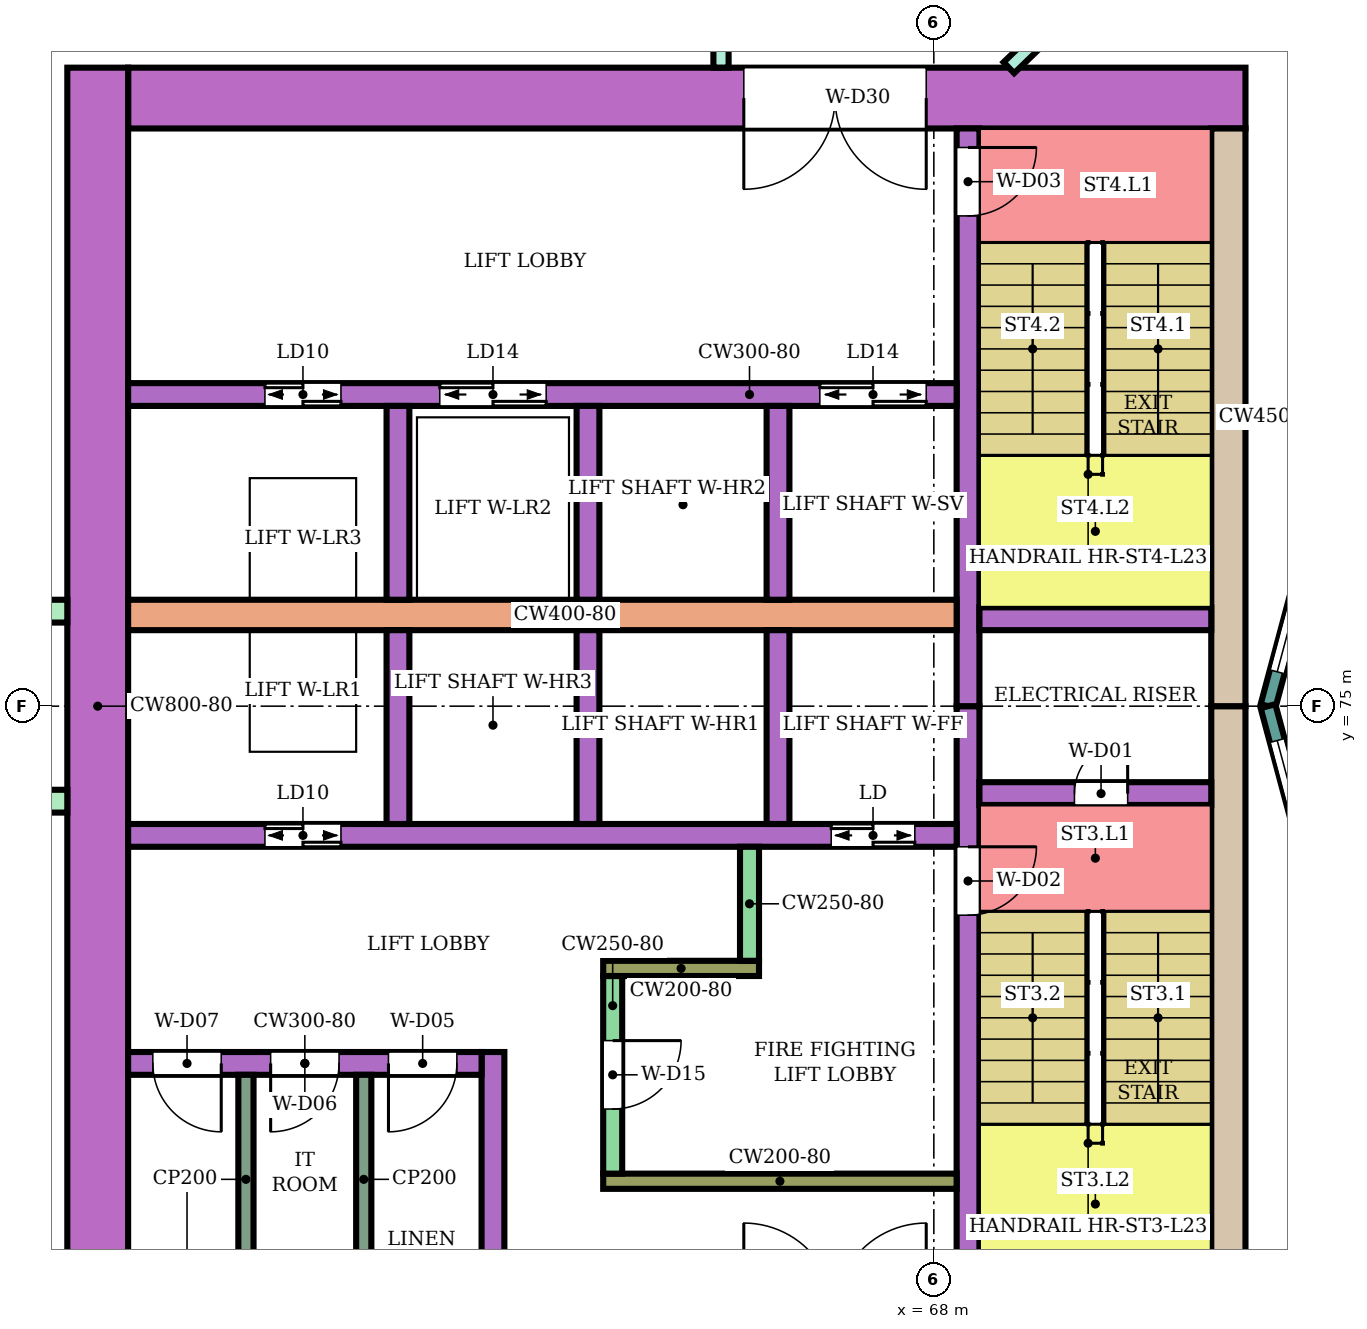
"""IFC4 building model, lengths in metres.
Left out: names, types, materials, properties, quantities, classifications, styles, units other than length and angle.
Written with IfcOpenShell. Run it as: python <this file> out.ifc"""

import sys

from ifc_helpers import new_model, si_unit, direction, frame, frame_2d, origin, place, context, subcontext, project, spatial, rectangle, extrude, element, fill, save


model = new_model("IFC4")
c1 = context("Model", 3, precision=1e-05, world=origin(), true_north=direction((0.0, 1.0)))
c2 = subcontext(c1, "Body", "Model", "MODEL_VIEW")
j1 = project(units=[si_unit("LENGTHUNIT", "METRE"), si_unit("PLANEANGLEUNIT", "RADIAN")], contexts=[c1])
p1 = place(None, origin())
s1 = spatial("IfcSite", under=j1, at=p1, CompositionType="ELEMENT")
p2 = place(p1, origin())
s2 = spatial("IfcBuilding", under=s1, at=p2, CompositionType="ELEMENT")
p3 = place(p2, frame((0.0, 0.0, 101.4)))
s3 = spatial("IfcBuildingStorey", under=s2, at=p3, CompositionType="ELEMENT", Elevation=101.4)
p4 = place(p3, frame((72.1, 83.0, 0.0), z_axis=(0.0, 0.0, 1.0), x_axis=(-1.0, 0.0, 0.0)))
e1 = element("IfcWall", 1, at=p4, inside=s3, PredefinedType="SHEAR", context=c2, shape_type="SweptSolid", body=[
    extrude(rectangle(XDim=14.7, YDim=0.8, at=frame_2d((7.35, 0.0))), origin(), (0.0, 0.0, 1.0), 3.48),
])
p5 = place(p4, frame((4.2, 0.0, 0.0)))
e2 = element("IfcOpeningElement", 2, at=p5, cuts=e1, PredefinedType="OPENING", context=c2, shape_type="SweptSolid", body=[
    extrude(rectangle(XDim=2.4, YDim=2.4, at=frame_2d((1.2, 1.2))), frame((0.0, 0.41, 0.0), z_axis=(0.0, -1.0, 0.0), x_axis=(1.0, 0.0, 0.0)), (0.0, 0.0, 1.0), 0.82),
])
for number, where, z_axis, x_axis in (
    (3, (71.875, 75.0, 0.0), (0.0, 0.0, 1.0), (0.0, -1.0, 0.0)),
    (4, (71.875, 82.6, 0.0), (0.0, 0.0, 1.0), (0.0, -1.0, 0.0)),
):
    element("IfcWall", number, at=place(p3, frame(where, z_axis=z_axis, x_axis=x_axis)), inside=s3, PredefinedType="SHEAR", context=c2, shape_type="SweptSolid", body=[
        extrude(rectangle(XDim=7.6, YDim=0.45, at=frame_2d((3.8, 0.0))), origin(), (0.0, 0.0, 1.0), 3.48),
    ])
p6 = place(p3, frame((57.0, 83.4, 0.0), z_axis=(0.0, 0.0, 1.0), x_axis=(0.0, -1.0, 0.0)))
e5 = element("IfcWall", 5, at=p6, inside=s3, PredefinedType="SHEAR", context=c2, shape_type="SweptSolid", body=[
    extrude(rectangle(XDim=16.8, YDim=0.8, at=frame_2d((8.4, 0.0))), origin(), (0.0, 0.0, 1.0), 3.48),
])
p7 = place(p3, frame((68.45, 75.0, 0.0), z_axis=(0.0, 0.0, 1.0), x_axis=(0.0, -1.0, 0.0)))
e6 = element("IfcWall", 6, at=p7, inside=s3, PredefinedType="SHEAR", context=c2, shape_type="SweptSolid", body=[
    extrude(rectangle(XDim=7.6, YDim=0.3, at=frame_2d((3.8, 0.0))), origin(), (0.0, 0.0, 1.0), 3.48),
])
p8 = place(p7, frame((1.85, 0.0, 0.0)))
e7 = element("IfcOpeningElement", 7, at=p8, cuts=e6, PredefinedType="OPENING", context=c2, shape_type="SweptSolid", body=[
    extrude(rectangle(XDim=0.9, YDim=2.1, at=frame_2d((0.45, 1.05))), frame((0.0, 0.16, 0.0), z_axis=(0.0, -1.0, 0.0), x_axis=(1.0, 0.0, 0.0)), (0.0, 0.0, 1.0), 0.32),
])
p9 = place(p3, frame((68.45, 82.6, 0.0), z_axis=(0.0, 0.0, 1.0), x_axis=(0.0, -1.0, 0.0)))
e8 = element("IfcWall", 8, at=p9, inside=s3, PredefinedType="SHEAR", context=c2, shape_type="SweptSolid", body=[
    extrude(rectangle(XDim=7.6, YDim=0.3, at=frame_2d((3.8, 0.0))), origin(), (0.0, 0.0, 1.0), 3.48),
])
p10 = place(p9, frame((0.25, 0.0, 0.0)))
e9 = element("IfcOpeningElement", 9, at=p10, cuts=e8, PredefinedType="OPENING", context=c2, shape_type="SweptSolid", body=[
    extrude(rectangle(XDim=0.9, YDim=2.1, at=frame_2d((0.45, 1.05))), frame((0.0, 0.16, 0.0), z_axis=(0.0, -1.0, 0.0), x_axis=(1.0, 0.0, 0.0)), (0.0, 0.0, 1.0), 0.32),
])
p11 = place(p3, frame((71.65, 73.85, 0.0), z_axis=(0.0, 0.0, 1.0), x_axis=(-1.0, 0.0, 0.0)))
e10 = element("IfcWall", 10, at=p11, inside=s3, PredefinedType="SHEAR", context=c2, shape_type="SweptSolid", body=[
    extrude(rectangle(XDim=3.05, YDim=0.3, at=frame_2d((1.525, 0.0))), origin(), (0.0, 0.0, 1.0), 3.48),
])
p12 = place(p11, frame((1.1, 0.0, 0.0)))
e11 = element("IfcOpeningElement", 11, at=p12, cuts=e10, PredefinedType="OPENING", context=c2, shape_type="SweptSolid", body=[
    extrude(rectangle(XDim=0.7, YDim=2.0, at=frame_2d((0.35, 1.0))), frame((0.0, 0.16, 0.0), z_axis=(0.0, -1.0, 0.0), x_axis=(1.0, 0.0, 0.0)), (0.0, 0.0, 1.0), 0.32),
])
p13 = place(p3, frame((71.65, 76.15, 0.0), z_axis=(0.0, 0.0, 1.0), x_axis=(-1.0, 0.0, 0.0)))
e12 = element("IfcWall", 12, at=p13, inside=s3, PredefinedType="SHEAR", context=c2, shape_type="SweptSolid", body=[
    extrude(rectangle(XDim=3.05, YDim=0.3, at=frame_2d((1.525, 0.0))), origin(), (0.0, 0.0, 1.0), 3.48),
])
p14 = place(p3, frame((68.3, 73.3, 0.0), z_axis=(0.0, 0.0, 1.0), x_axis=(-1.0, 0.0, 0.0)))
e13 = element("IfcWall", 13, at=p14, inside=s3, PredefinedType="SHEAR", context=c2, shape_type="SweptSolid", body=[
    extrude(rectangle(XDim=10.9, YDim=0.3, at=frame_2d((5.45, 0.0))), origin(), (0.0, 0.0, 1.0), 3.48),
])
p15 = place(p14, frame((0.55, 0.0, 0.0)))
e14 = element("IfcOpeningElement", 14, at=p15, cuts=e13, PredefinedType="OPENING", context=c2, shape_type="SweptSolid", body=[
    extrude(rectangle(XDim=1.1, YDim=2.1, at=frame_2d((0.55, 1.05))), frame((0.0, 0.16, 0.0), z_axis=(0.0, -1.0, 0.0), x_axis=(1.0, 0.0, 0.0)), (0.0, 0.0, 1.0), 0.32),
])
p16 = place(p14, frame((8.1, 0.0, 0.0)))
e15 = element("IfcOpeningElement", 15, at=p16, cuts=e13, PredefinedType="OPENING", context=c2, shape_type="SweptSolid", body=[
    extrude(rectangle(XDim=1.0, YDim=2.1, at=frame_2d((0.5, 1.05))), frame((0.0, 0.16, 0.0), z_axis=(0.0, -1.0, 0.0), x_axis=(1.0, 0.0, 0.0)), (0.0, 0.0, 1.0), 0.32),
])
p17 = place(p3, frame((68.3, 76.2, 0.0), z_axis=(0.0, 0.0, 1.0), x_axis=(-1.0, 0.0, 0.0)))
e16 = element("IfcWall", 16, at=p17, inside=s3, PredefinedType="SHEAR", context=c2, shape_type="SweptSolid", body=[
    extrude(rectangle(XDim=10.9, YDim=0.4, at=frame_2d((5.45, 0.0))), origin(), (0.0, 0.0, 1.0), 3.48),
])
p18 = place(p3, frame((68.3, 79.1, 0.0), z_axis=(0.0, 0.0, 1.0), x_axis=(-1.0, 0.0, 0.0)))
e17 = element("IfcWall", 17, at=p18, inside=s3, PredefinedType="SHEAR", context=c2, shape_type="SweptSolid", body=[
    extrude(rectangle(XDim=10.9, YDim=0.3, at=frame_2d((5.45, 0.0))), origin(), (0.0, 0.0, 1.0), 3.48),
])
p19 = place(p18, frame((0.4, 0.0, 0.0)))
e18 = element("IfcOpeningElement", 18, at=p19, cuts=e17, PredefinedType="OPENING", context=c2, shape_type="SweptSolid", body=[
    extrude(rectangle(XDim=1.4, YDim=2.1, at=frame_2d((0.7, 1.05))), frame((0.0, 0.16, 0.0), z_axis=(0.0, -1.0, 0.0), x_axis=(1.0, 0.0, 0.0)), (0.0, 0.0, 1.0), 0.32),
])
p20 = place(p18, frame((5.4, 0.0, 0.0)))
e19 = element("IfcOpeningElement", 19, at=p20, cuts=e17, PredefinedType="OPENING", context=c2, shape_type="SweptSolid", body=[
    extrude(rectangle(XDim=1.4, YDim=2.1, at=frame_2d((0.7, 1.05))), frame((0.0, 0.16, 0.0), z_axis=(0.0, -1.0, 0.0), x_axis=(1.0, 0.0, 0.0)), (0.0, 0.0, 1.0), 0.32),
])
p21 = place(p18, frame((8.1, 0.0, 0.0)))
e20 = element("IfcOpeningElement", 20, at=p21, cuts=e17, PredefinedType="OPENING", context=c2, shape_type="SweptSolid", body=[
    extrude(rectangle(XDim=1.0, YDim=2.1, at=frame_2d((0.5, 1.05))), frame((0.0, 0.16, 0.0), z_axis=(0.0, -1.0, 0.0), x_axis=(1.0, 0.0, 0.0)), (0.0, 0.0, 1.0), 0.32),
])
for number, where, z_axis, x_axis in (
    (21, (65.95, 76.0, 0.0), (0.0, 0.0, 1.0), (0.0, -1.0, 0.0)),
    (22, (63.45, 76.0, 0.0), (0.0, 0.0, 1.0), (0.0, -1.0, 0.0)),
    (23, (60.95, 76.0, 0.0), (0.0, 0.0, 1.0), (0.0, -1.0, 0.0)),
    (24, (65.95, 78.95, 0.0), (0.0, 0.0, 1.0), (0.0, -1.0, 0.0)),
    (25, (63.45, 78.95, 0.0), (0.0, 0.0, 1.0), (0.0, -1.0, 0.0)),
    (26, (60.95, 78.95, 0.0), (0.0, 0.0, 1.0), (0.0, -1.0, 0.0)),
):
    element("IfcWall", number, at=place(p3, frame(where, z_axis=z_axis, x_axis=x_axis)), inside=s3, PredefinedType="SHEAR", context=c2, shape_type="SweptSolid", body=[
        extrude(rectangle(XDim=2.55, YDim=0.3, at=frame_2d((1.275, 0.0))), origin(), (0.0, 0.0, 1.0), 3.48),
    ])
p22 = place(p3, frame((68.3, 68.75, 0.0), z_axis=(0.0, 0.0, 1.0), x_axis=(-1.0, 0.0, 0.0)))
e27 = element("IfcWall", 27, at=p22, inside=s3, PredefinedType="SHEAR", context=c2, shape_type="SweptSolid", body=[
    extrude(rectangle(XDim=4.65, YDim=0.2, at=frame_2d((2.325, 0.0))), origin(), (0.0, 0.0, 1.0), 3.48),
])
p23 = place(p3, frame((63.775, 71.45, 0.0), z_axis=(0.0, 0.0, 1.0), x_axis=(0.0, -1.0, 0.0)))
e28 = element("IfcWall", 28, at=p23, inside=s3, PredefinedType="SHEAR", context=c2, shape_type="SweptSolid", body=[
    extrude(rectangle(XDim=2.6, YDim=0.25, at=frame_2d((1.3, 0.0))), origin(), (0.0, 0.0, 1.0), 3.48),
])
p24 = place(p23, frame((0.85, 0.0, 0.0)))
e29 = element("IfcOpeningElement", 29, at=p24, cuts=e28, PredefinedType="OPENING", context=c2, shape_type="SweptSolid", body=[
    extrude(rectangle(XDim=0.9, YDim=2.1, at=frame_2d((0.45, 1.05))), frame((0.0, 0.135, 0.0), z_axis=(0.0, -1.0, 0.0), x_axis=(1.0, 0.0, 0.0)), (0.0, 0.0, 1.0), 0.27),
])
p25 = place(p3, frame((65.7, 71.55, 0.0), z_axis=(0.0, 0.0, 1.0), x_axis=(-1.0, 0.0, 0.0)))
e30 = element("IfcWall", 30, at=p25, inside=s3, PredefinedType="SHEAR", context=c2, shape_type="SweptSolid", body=[
    extrude(rectangle(XDim=2.05, YDim=0.2, at=frame_2d((1.025, 0.0))), origin(), (0.0, 0.0, 1.0), 3.48),
])
p26 = place(p3, frame((65.575, 73.15, 0.0), z_axis=(0.0, 0.0, 1.0), x_axis=(0.0, -1.0, 0.0)))
e31 = element("IfcWall", 31, at=p26, inside=s3, PredefinedType="SHEAR", context=c2, shape_type="SweptSolid", body=[
    extrude(rectangle(XDim=1.5, YDim=0.25, at=frame_2d((0.75, 0.0))), origin(), (0.0, 0.0, 1.0), 3.48),
])
p27 = place(p3, frame((62.2, 70.45, 0.0), z_axis=(0.0, 0.0, 1.0), x_axis=(0.0, -1.0, 0.0)))
e32 = element("IfcWall", 32, at=p27, inside=s3, PredefinedType="SHEAR", context=c2, shape_type="SweptSolid", body=[
    extrude(rectangle(XDim=3.05, YDim=0.3, at=frame_2d((1.525, 0.0))), origin(), (0.0, 0.0, 1.0), 3.48),
])
p28 = place(p3, frame((62.05, 70.3, 0.0), z_axis=(0.0, 0.0, 1.0), x_axis=(-1.0, 0.0, 0.0)))
e33 = element("IfcWall", 33, at=p28, inside=s3, PredefinedType="SHEAR", context=c2, shape_type="SweptSolid", body=[
    extrude(rectangle(XDim=4.65, YDim=0.3, at=frame_2d((2.325, 0.0))), origin(), (0.0, 0.0, 1.0), 3.48),
])
p29 = place(p28, frame((0.325, 0.0, 0.0)))
e34 = element("IfcOpeningElement", 34, at=p29, cuts=e33, PredefinedType="OPENING", context=c2, shape_type="SweptSolid", body=[
    extrude(rectangle(XDim=0.9, YDim=2.1, at=frame_2d((0.45, 1.05))), frame((0.0, 0.16, 0.0), z_axis=(0.0, -1.0, 0.0), x_axis=(1.0, 0.0, 0.0)), (0.0, 0.0, 1.0), 0.32),
])
p30 = place(p28, frame((1.875, 0.0, 0.0)))
e35 = element("IfcOpeningElement", 35, at=p30, cuts=e33, PredefinedType="OPENING", context=c2, shape_type="SweptSolid", body=[
    extrude(rectangle(XDim=0.9, YDim=2.1, at=frame_2d((0.45, 1.05))), frame((0.0, 0.16, 0.0), z_axis=(0.0, -1.0, 0.0), x_axis=(1.0, 0.0, 0.0)), (0.0, 0.0, 1.0), 0.32),
])
p31 = place(p28, frame((3.425, 0.0, 0.0)))
e36 = element("IfcOpeningElement", 36, at=p31, cuts=e33, PredefinedType="OPENING", context=c2, shape_type="SweptSolid", body=[
    extrude(rectangle(XDim=0.9, YDim=2.1, at=frame_2d((0.45, 1.05))), frame((0.0, 0.16, 0.0), z_axis=(0.0, -1.0, 0.0), x_axis=(1.0, 0.0, 0.0)), (0.0, 0.0, 1.0), 0.32),
])
for number, where, z_axis, x_axis in (
    (37, (56.6, 76.25, 0.0), (0.0, 0.0, 1.0), (-1.0, 0.0, 0.0)),
    (38, (56.6, 73.75, 0.0), (0.0, 0.0, 1.0), (-1.0, 0.0, 0.0)),
):
    element("IfcWall", number, at=place(p3, frame(where, z_axis=z_axis, x_axis=x_axis)), inside=s3, PredefinedType="NOTDEFINED", context=c2, shape_type="SweptSolid", body=[
        extrude(rectangle(XDim=2.416, YDim=0.3, at=frame_2d((1.208, 0.0))), origin(), (0.0, 0.0, 1.0), 3.8),
    ])
p32 = place(p3, frame((73.415, 78.802, 0.0), z_axis=(0.0, 0.0, 1.0), x_axis=(-0.258789828301, -0.965933654434, 0.0)))
e39 = element("IfcWall", 39, at=p32, inside=s3, PredefinedType="NOTDEFINED", context=c2, shape_type="SweptSolid", body=[
    extrude(rectangle(XDim=3.936, YDim=0.2, at=frame_2d((1.968, 0.0))), origin(), (0.0, 0.0, 1.0), 3.8),
])
p33 = place(p32, frame((0.468, 0.0, 0.9)))
e40 = element("IfcOpeningElement", 40, at=p33, cuts=e39, PredefinedType="OPENING", context=c2, shape_type="SweptSolid", body=[
    extrude(rectangle(XDim=3.0, YDim=2.3, at=frame_2d((1.5, 1.15))), frame((0.0, 0.11, 0.0), z_axis=(0.0, -1.0, 0.0), x_axis=(1.0, 0.0, 0.0)), (0.0, 0.0, 1.0), 0.22),
])
p34 = place(p3, frame((72.396, 75.0, 0.0), z_axis=(0.0, 0.0, 1.0), x_axis=(0.258789828301, -0.965933654434, 0.0)))
e41 = element("IfcWall", 41, at=p34, inside=s3, PredefinedType="NOTDEFINED", context=c2, shape_type="SweptSolid", body=[
    extrude(rectangle(XDim=3.936, YDim=0.2, at=frame_2d((1.968, 0.0))), origin(), (0.0, 0.0, 1.0), 3.8),
])
p35 = place(p34, frame((0.468, 0.0, 0.9)))
e42 = element("IfcOpeningElement", 42, at=p35, cuts=e41, PredefinedType="OPENING", context=c2, shape_type="SweptSolid", body=[
    extrude(rectangle(XDim=3.0, YDim=2.3, at=frame_2d((1.5, 1.15))), frame((0.0, 0.11, 0.0), z_axis=(0.0, -1.0, 0.0), x_axis=(1.0, 0.0, 0.0)), (0.0, 0.0, 1.0), 0.22),
])
p36 = place(p3, frame((65.2, 83.401, 0.0), z_axis=(0.0, 0.0, 1.0), x_axis=(0.0, 1.0, 0.0)))
e43 = element("IfcWall", 43, at=p36, inside=s3, PredefinedType="PARTITIONING", context=c2, shape_type="SweptSolid", body=[
    extrude(rectangle(XDim=1.399, YDim=0.2, at=frame_2d((0.7, 0.0))), origin(), (0.0, 0.0, 1.0), 3.35),
])
p37 = place(p3, frame((68.987, 83.4, 0.0), z_axis=(0.0, 0.0, 1.0), x_axis=(0.719586298962, 0.694403022997, 0.0)))
e44 = element("IfcWall", 44, at=p37, inside=s3, PredefinedType="PARTITIONING", context=c2, shape_type="SweptSolid", body=[
    extrude(rectangle(XDim=5.439, YDim=0.2, at=frame_2d((2.719, 0.0))), origin(), (0.0, 0.0, 1.0), 3.35),
])
for number, where, z_axis, x_axis in (
    (45, (60.5, 70.15, 0.0), (0.0, 0.0, 1.0), (0.0, -1.0, 0.0)),
    (46, (58.95, 70.15, 0.0), (0.0, 0.0, 1.0), (0.0, -1.0, 0.0)),
):
    element("IfcWall", number, at=place(p3, frame(where, z_axis=z_axis, x_axis=x_axis)), inside=s3, PredefinedType="PARTITIONING", context=c2, shape_type="SweptSolid", body=[
        extrude(rectangle(XDim=2.75, YDim=0.2, at=frame_2d((1.375, 0.0))), origin(), (0.0, 0.0, 1.0), 3.48),
    ])
p38 = place(p33, origin())
e47 = element("IfcWindow", 47, at=p38, inside=s3, PartitioningType="SINGLE_PANEL", PredefinedType="WINDOW", context=c2, shape_type="SweptSolid", body=[
    extrude(rectangle(XDim=3.0, YDim=2.3, at=frame_2d((1.5, 1.15))), frame((0.0, 0.03, 0.0), z_axis=(0.0, -1.0, 0.0), x_axis=(1.0, 0.0, 0.0)), (0.0, 0.0, 1.0), 0.06),
])
fill(e40, e47)
p39 = place(p35, origin())
e48 = element("IfcWindow", 48, at=p39, inside=s3, PartitioningType="SINGLE_PANEL", PredefinedType="WINDOW", context=c2, shape_type="SweptSolid", body=[
    extrude(rectangle(XDim=3.0, YDim=2.3, at=frame_2d((1.5, 1.15))), frame((0.0, 0.03, 0.0), z_axis=(0.0, -1.0, 0.0), x_axis=(1.0, 0.0, 0.0)), (0.0, 0.0, 1.0), 0.06),
])
fill(e42, e48)
p40 = place(p12, frame((0.7, 0.0, 0.0), z_axis=(0.0, 0.0, 1.0), x_axis=(-1.0, 0.0, 0.0)))
e49 = element("IfcDoor", 49, at=p40, inside=s3, OperationType="SINGLE_SWING_RIGHT", PredefinedType="DOOR", context=c2, shape_type="SweptSolid", body=[
    extrude(rectangle(XDim=0.7, YDim=2.0, at=frame_2d((0.35, 1.0))), frame((0.0, 0.025, 0.0), z_axis=(0.0, -1.0, 0.0), x_axis=(1.0, 0.0, 0.0)), (0.0, 0.0, 1.0), 0.05),
])
fill(e11, e49)
p41 = place(p8, origin())
e50 = element("IfcDoor", 50, at=p41, inside=s3, OperationType="SINGLE_SWING_LEFT", PredefinedType="DOOR", context=c2, shape_type="SweptSolid", body=[
    extrude(rectangle(XDim=0.9, YDim=2.1, at=frame_2d((0.45, 1.05))), frame((0.0, 0.025, 0.0), z_axis=(0.0, -1.0, 0.0), x_axis=(1.0, 0.0, 0.0)), (0.0, 0.0, 1.0), 0.05),
])
fill(e7, e50)
p42 = place(p10, origin())
e51 = element("IfcDoor", 51, at=p42, inside=s3, OperationType="SINGLE_SWING_LEFT", PredefinedType="DOOR", context=c2, shape_type="SweptSolid", body=[
    extrude(rectangle(XDim=0.9, YDim=2.1, at=frame_2d((0.45, 1.05))), frame((0.0, 0.025, 0.0), z_axis=(0.0, -1.0, 0.0), x_axis=(1.0, 0.0, 0.0)), (0.0, 0.0, 1.0), 0.05),
])
fill(e9, e51)
p43 = place(p15, origin())
e52 = element("IfcDoor", 52, at=p43, inside=s3, OperationType="DOUBLE_DOOR_SLIDING", PredefinedType="DOOR", context=c2, shape_type="SweptSolid", body=[
    extrude(rectangle(XDim=1.1, YDim=2.1, at=frame_2d((0.55, 1.05))), frame((0.0, 0.025, 0.0), z_axis=(0.0, -1.0, 0.0), x_axis=(1.0, 0.0, 0.0)), (0.0, 0.0, 1.0), 0.05),
])
fill(e14, e52)
p44 = place(p16, origin())
e53 = element("IfcDoor", 53, at=p44, inside=s3, OperationType="DOUBLE_DOOR_SLIDING", PredefinedType="DOOR", context=c2, shape_type="SweptSolid", body=[
    extrude(rectangle(XDim=1.0, YDim=2.1, at=frame_2d((0.5, 1.05))), frame((0.0, 0.025, 0.0), z_axis=(0.0, -1.0, 0.0), x_axis=(1.0, 0.0, 0.0)), (0.0, 0.0, 1.0), 0.05),
])
fill(e15, e53)
p45 = place(p19, origin())
e54 = element("IfcDoor", 54, at=p45, inside=s3, OperationType="DOUBLE_DOOR_SLIDING", PredefinedType="DOOR", context=c2, shape_type="SweptSolid", body=[
    extrude(rectangle(XDim=1.4, YDim=2.1, at=frame_2d((0.7, 1.05))), frame((0.0, 0.025, 0.0), z_axis=(0.0, -1.0, 0.0), x_axis=(1.0, 0.0, 0.0)), (0.0, 0.0, 1.0), 0.05),
])
fill(e18, e54)
p46 = place(p20, origin())
e55 = element("IfcDoor", 55, at=p46, inside=s3, OperationType="DOUBLE_DOOR_SLIDING", PredefinedType="DOOR", context=c2, shape_type="SweptSolid", body=[
    extrude(rectangle(XDim=1.4, YDim=2.1, at=frame_2d((0.7, 1.05))), frame((0.0, 0.025, 0.0), z_axis=(0.0, -1.0, 0.0), x_axis=(1.0, 0.0, 0.0)), (0.0, 0.0, 1.0), 0.05),
])
fill(e19, e55)
p47 = place(p21, origin())
e56 = element("IfcDoor", 56, at=p47, inside=s3, OperationType="DOUBLE_DOOR_SLIDING", PredefinedType="DOOR", context=c2, shape_type="SweptSolid", body=[
    extrude(rectangle(XDim=1.0, YDim=2.1, at=frame_2d((0.5, 1.05))), frame((0.0, 0.025, 0.0), z_axis=(0.0, -1.0, 0.0), x_axis=(1.0, 0.0, 0.0)), (0.0, 0.0, 1.0), 0.05),
])
fill(e20, e56)
p48 = place(p24, origin())
e57 = element("IfcDoor", 57, at=p48, inside=s3, OperationType="SINGLE_SWING_LEFT", PredefinedType="DOOR", context=c2, shape_type="SweptSolid", body=[
    extrude(rectangle(XDim=0.9, YDim=2.1, at=frame_2d((0.45, 1.05))), frame((0.0, 0.025, 0.0), z_axis=(0.0, -1.0, 0.0), x_axis=(1.0, 0.0, 0.0)), (0.0, 0.0, 1.0), 0.05),
])
fill(e29, e57)
p49 = place(p29, origin())
e58 = element("IfcDoor", 58, at=p49, inside=s3, OperationType="SINGLE_SWING_RIGHT", PredefinedType="DOOR", context=c2, shape_type="SweptSolid", body=[
    extrude(rectangle(XDim=0.9, YDim=2.1, at=frame_2d((0.45, 1.05))), frame((0.0, 0.025, 0.0), z_axis=(0.0, -1.0, 0.0), x_axis=(1.0, 0.0, 0.0)), (0.0, 0.0, 1.0), 0.05),
])
fill(e34, e58)
p50 = place(p30, origin())
e59 = element("IfcDoor", 59, at=p50, inside=s3, OperationType="SINGLE_SWING_RIGHT", PredefinedType="DOOR", context=c2, shape_type="SweptSolid", body=[
    extrude(rectangle(XDim=0.9, YDim=2.1, at=frame_2d((0.45, 1.05))), frame((0.0, 0.025, 0.0), z_axis=(0.0, -1.0, 0.0), x_axis=(1.0, 0.0, 0.0)), (0.0, 0.0, 1.0), 0.05),
])
fill(e35, e59)
p51 = place(p31, origin())
e60 = element("IfcDoor", 60, at=p51, inside=s3, OperationType="SINGLE_SWING_LEFT", PredefinedType="DOOR", context=c2, shape_type="SweptSolid", body=[
    extrude(rectangle(XDim=0.9, YDim=2.1, at=frame_2d((0.45, 1.05))), frame((0.0, 0.025, 0.0), z_axis=(0.0, -1.0, 0.0), x_axis=(1.0, 0.0, 0.0)), (0.0, 0.0, 1.0), 0.05),
])
fill(e36, e60)
p52 = place(p5, origin())
e61 = element("IfcDoor", 61, at=p52, inside=s3, OperationType="DOUBLE_DOOR_SINGLE_SWING", PredefinedType="DOOR", context=c2, shape_type="SweptSolid", body=[
    extrude(rectangle(XDim=2.4, YDim=2.4, at=frame_2d((1.2, 1.2))), frame((0.0, 0.025, 0.0), z_axis=(0.0, -1.0, 0.0), x_axis=(1.0, 0.0, 0.0)), (0.0, 0.0, 1.0), 0.05),
])
fill(e2, e61)
save(model, sys.argv[1])
